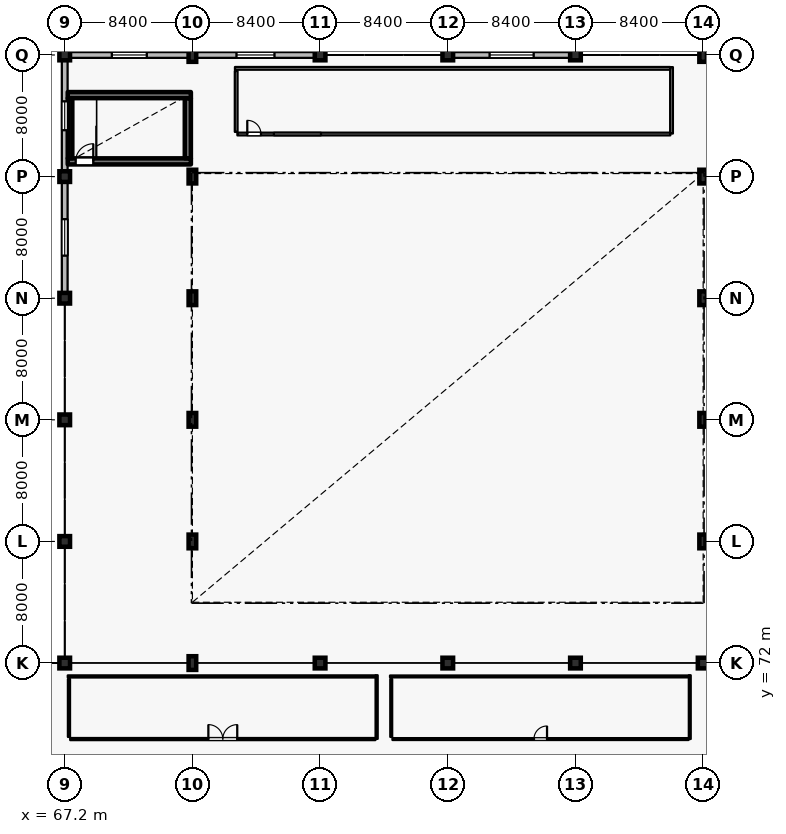
"""IFC4 building model, lengths in metres.
Left out: names, types, materials, properties, quantities, classifications, styles, units other than length and angle.
Written with IfcOpenShell. Run it as: python <this file> out.ifc"""

import sys

from ifc_helpers import new_model, si_unit, direction, frame, frame_2d, origin, origin_2d, place, context, subcontext, project, spatial, rectangle, hollow_rectangle, extrude, element, fill, save


model = new_model("IFC4")
c1 = context("Model", 3, precision=1e-05, world=origin(), true_north=direction((0.0, 1.0)))
c2 = subcontext(c1, "Body", "Model", "MODEL_VIEW")
j1 = project(units=[si_unit("LENGTHUNIT", "METRE"), si_unit("PLANEANGLEUNIT", "RADIAN")], contexts=[c1])
p1 = place(None, origin())
s1 = spatial("IfcSite", under=j1, at=p1, CompositionType="ELEMENT")
p2 = place(p1, origin())
s2 = spatial("IfcBuilding", under=s1, at=p2, CompositionType="ELEMENT")
p3 = place(p2, frame((0.0, 0.0, 11.4)))
s3 = spatial("IfcBuildingStorey", under=s2, at=p3, CompositionType="ELEMENT", Elevation=11.4)
for number, where, z_axis, x_axis in (
    (1, (67.2, 72.0, 0.0), (0.0, 0.0, 1.0), (1.0, 0.0, 0.0)),
    (2, (67.2, 80.0, 0.0), (0.0, 0.0, 1.0), (1.0, 0.0, 0.0)),
    (3, (67.2, 88.0, 0.0), (0.0, 0.0, 1.0), (1.0, 0.0, 0.0)),
    (4, (67.2, 96.0, 0.0), (0.0, 0.0, 1.0), (1.0, 0.0, 0.0)),
    (5, (67.2, 104.0, 0.0), (0.0, 0.0, 1.0), (1.0, 0.0, 0.0)),
    (6, (67.2, 112.0, 0.0), (0.0, 0.0, 1.0), (1.0, 0.0, 0.0)),
):
    element("IfcColumn", number, at=place(p3, frame(where, z_axis=z_axis, x_axis=x_axis)), inside=s3, PredefinedType="COLUMN", context=c2, shape_type="SweptSolid", body=[
        extrude(rectangle(XDim=0.7, YDim=0.7, at=origin_2d()), origin(), (0.0, 0.0, 1.0), 4.8),
    ])
for number, where, z_axis, x_axis in (
    (7, (75.6, 72.0, 0.0), (0.0, 0.0, 1.0), (1.0, 0.0, 0.0)),
    (8, (75.6, 80.0, 0.0), (0.0, 0.0, 1.0), (1.0, 0.0, 0.0)),
    (9, (75.6, 88.0, 0.0), (0.0, 0.0, 1.0), (1.0, 0.0, 0.0)),
    (10, (75.6, 96.0, 0.0), (0.0, 0.0, 1.0), (1.0, 0.0, 0.0)),
    (11, (75.6, 104.0, 0.0), (0.0, 0.0, 1.0), (1.0, 0.0, 0.0)),
    (12, (75.6, 112.0, 0.0), (0.0, 0.0, 1.0), (1.0, 0.0, 0.0)),
):
    element("IfcColumn", number, at=place(p3, frame(where, z_axis=z_axis, x_axis=x_axis)), inside=s3, PredefinedType="COLUMN", context=c2, shape_type="SweptSolid", body=[
        extrude(hollow_rectangle(XDim=0.5, YDim=0.9, WallThickness=0.024, at=origin_2d()), origin(), (0.0, 0.0, 1.0), 4.8),
    ])
for number, where, z_axis, x_axis in (
    (13, (84.0, 72.0, 0.0), (0.0, 0.0, 1.0), (1.0, 0.0, 0.0)),
    (14, (84.0, 112.0, 0.0), (0.0, 0.0, 1.0), (1.0, 0.0, 0.0)),
    (15, (92.4, 72.0, 0.0), (0.0, 0.0, 1.0), (1.0, 0.0, 0.0)),
    (16, (92.4, 112.0, 0.0), (0.0, 0.0, 1.0), (1.0, 0.0, 0.0)),
    (17, (100.8, 72.0, 0.0), (0.0, 0.0, 1.0), (1.0, 0.0, 0.0)),
    (18, (100.8, 112.0, 0.0), (0.0, 0.0, 1.0), (1.0, 0.0, 0.0)),
    (19, (109.2, 72.0, 0.0), (0.0, 0.0, 1.0), (1.0, 0.0, 0.0)),
):
    element("IfcColumn", number, at=place(p3, frame(where, z_axis=z_axis, x_axis=x_axis)), inside=s3, PredefinedType="COLUMN", context=c2, shape_type="SweptSolid", body=[
        extrude(rectangle(XDim=0.7, YDim=0.7, at=origin_2d()), origin(), (0.0, 0.0, 1.0), 4.8),
    ])
for number, where, z_axis, x_axis in (
    (20, (109.2, 80.0, 0.0), (0.0, 0.0, 1.0), (1.0, 0.0, 0.0)),
    (21, (109.2, 88.0, 0.0), (0.0, 0.0, 1.0), (1.0, 0.0, 0.0)),
    (22, (109.2, 96.0, 0.0), (0.0, 0.0, 1.0), (1.0, 0.0, 0.0)),
    (23, (109.2, 104.0, 0.0), (0.0, 0.0, 1.0), (1.0, 0.0, 0.0)),
    (24, (109.2, 112.0, 0.0), (0.0, 0.0, 1.0), (1.0, 0.0, 0.0)),
):
    element("IfcColumn", number, at=place(p3, frame(where, z_axis=z_axis, x_axis=x_axis)), inside=s3, PredefinedType="COLUMN", context=c2, shape_type="SweptSolid", body=[
        extrude(hollow_rectangle(XDim=0.5, YDim=0.9, WallThickness=0.024, at=origin_2d()), origin(), (0.0, 0.0, 1.0), 4.8),
    ])
p4 = place(p3, frame((67.2, 96.35, 0.0), z_axis=(0.0, 0.0, 1.0), x_axis=(0.0, 1.0, 0.0)))
e25 = element("IfcWall", 25, at=p4, inside=s3, PredefinedType="SOLIDWALL", context=c2, shape_type="SweptSolid", body=[
    extrude(rectangle(XDim=7.3, YDim=0.38, at=frame_2d((3.65, 0.0))), origin(), (0.0, 0.0, 1.0), 4.05),
])
p5 = place(p4, frame((2.45, 0.0, 1.05)))
e26 = element("IfcOpeningElement", 26, at=p5, cuts=e25, PredefinedType="OPENING", context=c2, shape_type="SweptSolid", body=[
    extrude(rectangle(XDim=2.4, YDim=1.2, at=frame_2d((1.2, 0.6))), frame((0.0, 0.2, 0.0), z_axis=(0.0, -1.0, 0.0), x_axis=(1.0, 0.0, 0.0)), (0.0, 0.0, 1.0), 0.4),
])
p6 = place(p3, frame((67.2, 104.35, 0.0), z_axis=(0.0, 0.0, 1.0), x_axis=(0.0, 1.0, 0.0)))
e27 = element("IfcWall", 27, at=p6, inside=s3, PredefinedType="SOLIDWALL", context=c2, shape_type="SweptSolid", body=[
    extrude(rectangle(XDim=7.3, YDim=0.38, at=frame_2d((3.65, 0.0))), origin(), (0.0, 0.0, 1.0), 4.05),
])
p7 = place(p6, frame((2.7, 0.0, 1.05)))
e28 = element("IfcOpeningElement", 28, at=p7, cuts=e27, PredefinedType="OPENING", context=c2, shape_type="SweptSolid", body=[
    extrude(rectangle(XDim=1.9, YDim=1.4, at=frame_2d((0.95, 0.7))), frame((0.0, 0.2, 0.0), z_axis=(0.0, -1.0, 0.0), x_axis=(1.0, 0.0, 0.0)), (0.0, 0.0, 1.0), 0.4),
])
p8 = place(p3, frame((67.55, 112.0, 0.0), z_axis=(0.0, 0.0, 1.0), x_axis=(1.0, 0.0, 0.0)))
e29 = element("IfcWall", 29, at=p8, inside=s3, PredefinedType="SOLIDWALL", context=c2, shape_type="SweptSolid", body=[
    extrude(rectangle(XDim=7.8, YDim=0.38, at=frame_2d((3.9, 0.0))), origin(), (0.0, 0.0, 1.0), 3.9),
])
p9 = place(p8, frame((2.75, 0.0, 1.05)))
e30 = element("IfcOpeningElement", 30, at=p9, cuts=e29, PredefinedType="OPENING", context=c2, shape_type="SweptSolid", body=[
    extrude(rectangle(XDim=2.3, YDim=1.5, at=frame_2d((1.15, 0.75))), frame((0.0, 0.2, 0.0), z_axis=(0.0, -1.0, 0.0), x_axis=(1.0, 0.0, 0.0)), (0.0, 0.0, 1.0), 0.4),
])
p10 = place(p3, frame((75.85, 112.0, 0.0), z_axis=(0.0, 0.0, 1.0), x_axis=(1.0, 0.0, 0.0)))
e31 = element("IfcWall", 31, at=p10, inside=s3, PredefinedType="SOLIDWALL", context=c2, shape_type="SweptSolid", body=[
    extrude(rectangle(XDim=7.8, YDim=0.38, at=frame_2d((3.9, 0.0))), origin(), (0.0, 0.0, 1.0), 3.9),
])
p11 = place(p10, frame((2.65, 0.0, 1.05)))
e32 = element("IfcOpeningElement", 32, at=p11, cuts=e31, PredefinedType="OPENING", context=c2, shape_type="SweptSolid", body=[
    extrude(rectangle(XDim=2.5, YDim=1.65, at=frame_2d((1.25, 0.825))), frame((0.0, 0.2, 0.0), z_axis=(0.0, -1.0, 0.0), x_axis=(1.0, 0.0, 0.0)), (0.0, 0.0, 1.0), 0.4),
])
p12 = place(p3, frame((92.75, 112.0, 0.0), z_axis=(0.0, 0.0, 1.0), x_axis=(1.0, 0.0, 0.0)))
e33 = element("IfcWall", 33, at=p12, inside=s3, PredefinedType="SOLIDWALL", context=c2, shape_type="SweptSolid", body=[
    extrude(rectangle(XDim=7.7, YDim=0.38, at=frame_2d((3.85, 0.0))), origin(), (0.0, 0.0, 1.0), 3.9),
])
p13 = place(p12, frame((2.4, 0.0, 1.05)))
e34 = element("IfcOpeningElement", 34, at=p13, cuts=e33, PredefinedType="OPENING", context=c2, shape_type="SweptSolid", body=[
    extrude(rectangle(XDim=2.9, YDim=1.75, at=frame_2d((1.45, 0.875))), frame((0.0, 0.2, 0.0), z_axis=(0.0, -1.0, 0.0), x_axis=(1.0, 0.0, 0.0)), (0.0, 0.0, 1.0), 0.4),
])
p14 = place(p3, frame((67.4, 105.0, 0.0), z_axis=(0.0, 0.0, 1.0), x_axis=(1.0, 0.0, 0.0)))
e35 = element("IfcWall", 35, at=p14, inside=s3, PredefinedType="SHEAR", context=c2, shape_type="SweptSolid", body=[
    extrude(rectangle(XDim=8.1, YDim=0.4, at=frame_2d((4.05, 0.0))), origin(), (0.0, 0.0, 1.0), 4.535),
])
p15 = place(p14, frame((0.52, 0.0, 0.0)))
e36 = element("IfcOpeningElement", 36, at=p15, cuts=e35, PredefinedType="OPENING", context=c2, shape_type="SweptSolid", body=[
    extrude(rectangle(XDim=1.16, YDim=2.2, at=frame_2d((0.58, 1.1))), frame((0.0, 0.21, 0.0), z_axis=(0.0, -1.0, 0.0), x_axis=(1.0, 0.0, 0.0)), (0.0, 0.0, 1.0), 0.42),
])
p16 = place(p3, frame((75.3, 105.205, 0.0), z_axis=(0.0, 0.0, 1.0), x_axis=(0.0, 1.0, 0.0)))
e37 = element("IfcWall", 37, at=p16, inside=s3, PredefinedType="SHEAR", context=c2, shape_type="SweptSolid", body=[
    extrude(rectangle(XDim=3.95, YDim=0.4, at=frame_2d((1.975, 0.0))), origin(), (0.0, 0.0, 1.0), 4.535),
])
p17 = place(p3, frame((67.4, 109.36, 0.0), z_axis=(0.0, 0.0, 1.0), x_axis=(1.0, 0.0, 0.0)))
e38 = element("IfcWall", 38, at=p17, inside=s3, PredefinedType="SHEAR", context=c2, shape_type="SweptSolid", body=[
    extrude(rectangle(XDim=8.1, YDim=0.4, at=frame_2d((4.05, 0.0))), origin(), (0.0, 0.0, 1.0), 4.535),
])
p18 = place(p3, frame((67.55, 105.205, 0.0), z_axis=(0.0, 0.0, 1.0), x_axis=(0.0, 1.0, 0.0)))
e39 = element("IfcWall", 39, at=p18, inside=s3, PredefinedType="SHEAR", context=c2, shape_type="SweptSolid", body=[
    extrude(rectangle(XDim=3.95, YDim=0.3, at=frame_2d((1.975, 0.0))), origin(), (0.0, 0.0, 1.0), 4.535),
])
p19 = place(p3, frame((78.56, 106.8, 0.0), z_axis=(0.0, 0.0, 1.0), x_axis=(1.0, 0.0, 0.0)))
e40 = element("IfcWall", 40, at=p19, inside=s3, PredefinedType="PARTITIONING", context=c2, shape_type="SweptSolid", body=[
    extrude(rectangle(XDim=28.48, YDim=0.18, at=frame_2d((14.24, 0.0))), origin(), (0.0, 0.0, 1.0), 4.535),
])
p20 = place(p19, frame((0.65, 0.0, 0.0)))
e41 = element("IfcOpeningElement", 41, at=p20, cuts=e40, PredefinedType="OPENING", context=c2, shape_type="SweptSolid", body=[
    extrude(rectangle(XDim=0.9, YDim=2.1, at=frame_2d((0.45, 1.05))), frame((0.0, 0.1, 0.0), z_axis=(0.0, -1.0, 0.0), x_axis=(1.0, 0.0, 0.0)), (0.0, 0.0, 1.0), 0.2),
])
p21 = place(p19, frame((2.4, 0.0, 0.9)))
e42 = element("IfcOpeningElement", 42, at=p21, cuts=e40, PredefinedType="OPENING", context=c2, shape_type="SweptSolid", body=[
    extrude(rectangle(XDim=3.1, YDim=1.3, at=frame_2d((1.55, 0.65))), frame((0.0, 0.1, 0.0), z_axis=(0.0, -1.0, 0.0), x_axis=(1.0, 0.0, 0.0)), (0.0, 0.0, 1.0), 0.2),
])
p22 = place(p3, frame((78.48, 106.94, 0.0), z_axis=(0.0, 0.0, 1.0), x_axis=(0.0, 1.0, 0.0)))
e43 = element("IfcWall", 43, at=p22, inside=s3, PredefinedType="PARTITIONING", context=c2, shape_type="SweptSolid", body=[
    extrude(rectangle(XDim=4.01, YDim=0.18, at=frame_2d((2.005, 0.0))), origin(), (0.0, 0.0, 1.0), 4.535),
])
p23 = place(p3, frame((67.56, 67.0, 0.0), z_axis=(0.0, 0.0, 1.0), x_axis=(1.0, 0.0, 0.0)))
e44 = element("IfcWall", 44, at=p23, inside=s3, PredefinedType="PARTITIONING", context=c2, shape_type="SweptSolid", body=[
    extrude(rectangle(XDim=20.08, YDim=0.14, at=frame_2d((10.04, 0.0))), origin(), (0.0, 0.0, 1.0), 4.535),
])
p24 = place(p23, frame((9.09, 0.0, 0.0)))
e45 = element("IfcOpeningElement", 45, at=p24, cuts=e44, PredefinedType="OPENING", context=c2, shape_type="SweptSolid", body=[
    extrude(rectangle(XDim=1.9, YDim=2.4, at=frame_2d((0.95, 1.2))), frame((0.0, 0.08, 0.0), z_axis=(0.0, -1.0, 0.0), x_axis=(1.0, 0.0, 0.0)), (0.0, 0.0, 1.0), 0.16),
])
p25 = place(p3, frame((67.48, 67.14, 0.0), z_axis=(0.0, 0.0, 1.0), x_axis=(0.0, 1.0, 0.0)))
e46 = element("IfcWall", 46, at=p25, inside=s3, PredefinedType="PARTITIONING", context=c2, shape_type="SweptSolid", body=[
    extrude(rectangle(XDim=3.81, YDim=0.14, at=frame_2d((1.905, 0.0))), origin(), (0.0, 0.0, 1.0), 4.535),
])
p26 = place(p3, frame((88.76, 67.0, 0.0), z_axis=(0.0, 0.0, 1.0), x_axis=(1.0, 0.0, 0.0)))
e47 = element("IfcWall", 47, at=p26, inside=s3, PredefinedType="PARTITIONING", context=c2, shape_type="SweptSolid", body=[
    extrude(rectangle(XDim=19.48, YDim=0.125, at=frame_2d((9.74, 0.0))), origin(), (0.0, 0.0, 1.0), 4.535),
])
p27 = place(p26, frame((9.31, 0.0, 0.0)))
e48 = element("IfcOpeningElement", 48, at=p27, cuts=e47, PredefinedType="OPENING", context=c2, shape_type="SweptSolid", body=[
    extrude(rectangle(XDim=0.86, YDim=2.12, at=frame_2d((0.43, 1.06))), frame((0.0, 0.073, 0.0), z_axis=(0.0, -1.0, 0.0), x_axis=(1.0, 0.0, 0.0)), (0.0, 0.0, 1.0), 0.145),
])
p28 = place(p3, frame((88.68, 67.14, 0.0), z_axis=(0.0, 0.0, 1.0), x_axis=(0.0, 1.0, 0.0)))
e49 = element("IfcWall", 49, at=p28, inside=s3, PredefinedType="PARTITIONING", context=c2, shape_type="SweptSolid", body=[
    extrude(rectangle(XDim=3.81, YDim=0.125, at=frame_2d((1.905, 0.0))), origin(), (0.0, 0.0, 1.0), 4.535),
])
p29 = place(p3, frame((107.12, 106.832, 0.0), z_axis=(0.0, 0.0, 1.0), x_axis=(0.0, 1.0, 0.0)))
e50 = element("IfcWall", 50, at=p29, inside=s3, PredefinedType="PARTITIONING", context=c2, shape_type="SweptSolid", body=[
    extrude(rectangle(XDim=4.368, YDim=0.18, at=frame_2d((2.184, 0.0))), origin(), (0.0, 0.0, 1.0), 4.535),
])
p30 = place(p3, frame((78.4, 111.12, 0.0), z_axis=(0.0, 0.0, 1.0), x_axis=(1.0, 0.0, 0.0)))
e51 = element("IfcWall", 51, at=p30, inside=s3, PredefinedType="PARTITIONING", context=c2, shape_type="SweptSolid", body=[
    extrude(rectangle(XDim=28.63, YDim=0.18, at=frame_2d((14.315, 0.0))), origin(), (0.0, 0.0, 1.0), 4.535),
])
p31 = place(p3, frame((87.72, 67.012, 0.0), z_axis=(0.0, 0.0, 1.0), x_axis=(0.0, 1.0, 0.0)))
e52 = element("IfcWall", 52, at=p31, inside=s3, PredefinedType="PARTITIONING", context=c2, shape_type="SweptSolid", body=[
    extrude(rectangle(XDim=4.188, YDim=0.14, at=frame_2d((2.094, 0.0))), origin(), (0.0, 0.0, 1.0), 4.535),
])
p32 = place(p3, frame((67.4, 71.12, 0.0), z_axis=(0.0, 0.0, 1.0), x_axis=(1.0, 0.0, 0.0)))
e53 = element("IfcWall", 53, at=p32, inside=s3, PredefinedType="PARTITIONING", context=c2, shape_type="SweptSolid", body=[
    extrude(rectangle(XDim=20.25, YDim=0.14, at=frame_2d((10.125, 0.0))), origin(), (0.0, 0.0, 1.0), 4.535),
])
p33 = place(p3, frame((108.32, 67.004, 0.0), z_axis=(0.0, 0.0, 1.0), x_axis=(0.0, 1.0, 0.0)))
e54 = element("IfcWall", 54, at=p33, inside=s3, PredefinedType="PARTITIONING", context=c2, shape_type="SweptSolid", body=[
    extrude(rectangle(XDim=4.196, YDim=0.125, at=frame_2d((2.098, 0.0))), origin(), (0.0, 0.0, 1.0), 4.535),
])
p34 = place(p3, frame((88.6, 71.12, 0.0), z_axis=(0.0, 0.0, 1.0), x_axis=(1.0, 0.0, 0.0)))
e55 = element("IfcWall", 55, at=p34, inside=s3, PredefinedType="PARTITIONING", context=c2, shape_type="SweptSolid", body=[
    extrude(rectangle(XDim=19.658, YDim=0.125, at=frame_2d((9.829, 0.0))), origin(), (0.0, 0.0, 1.0), 4.535),
])
p35 = place(p5, origin())
e56 = element("IfcWindow", 56, at=p35, inside=s3, PartitioningType="DOUBLE_PANEL_VERTICAL", PredefinedType="WINDOW", context=c2, shape_type="SweptSolid", body=[
    extrude(rectangle(XDim=2.4, YDim=1.2, at=frame_2d((1.2, 0.6))), frame((0.0, 0.03, 0.0), z_axis=(0.0, -1.0, 0.0), x_axis=(1.0, 0.0, 0.0)), (0.0, 0.0, 1.0), 0.06),
])
fill(e26, e56)
p36 = place(p7, origin())
e57 = element("IfcWindow", 57, at=p36, inside=s3, PartitioningType="DOUBLE_PANEL_VERTICAL", PredefinedType="WINDOW", context=c2, shape_type="SweptSolid", body=[
    extrude(rectangle(XDim=1.9, YDim=1.4, at=frame_2d((0.95, 0.7))), frame((0.0, 0.03, 0.0), z_axis=(0.0, -1.0, 0.0), x_axis=(1.0, 0.0, 0.0)), (0.0, 0.0, 1.0), 0.06),
])
fill(e28, e57)
p37 = place(p9, origin())
e58 = element("IfcWindow", 58, at=p37, inside=s3, PartitioningType="DOUBLE_PANEL_VERTICAL", PredefinedType="WINDOW", context=c2, shape_type="SweptSolid", body=[
    extrude(rectangle(XDim=2.3, YDim=1.5, at=frame_2d((1.15, 0.75))), frame((0.0, 0.03, 0.0), z_axis=(0.0, -1.0, 0.0), x_axis=(1.0, 0.0, 0.0)), (0.0, 0.0, 1.0), 0.06),
])
fill(e30, e58)
p38 = place(p11, origin())
e59 = element("IfcWindow", 59, at=p38, inside=s3, PartitioningType="DOUBLE_PANEL_VERTICAL", PredefinedType="WINDOW", context=c2, shape_type="SweptSolid", body=[
    extrude(rectangle(XDim=2.5, YDim=1.65, at=frame_2d((1.25, 0.825))), frame((0.0, 0.03, 0.0), z_axis=(0.0, -1.0, 0.0), x_axis=(1.0, 0.0, 0.0)), (0.0, 0.0, 1.0), 0.06),
])
fill(e32, e59)
p39 = place(p13, origin())
e60 = element("IfcWindow", 60, at=p39, inside=s3, PartitioningType="DOUBLE_PANEL_VERTICAL", PredefinedType="WINDOW", context=c2, shape_type="SweptSolid", body=[
    extrude(rectangle(XDim=2.9, YDim=1.75, at=frame_2d((1.45, 0.875))), frame((0.0, 0.03, 0.0), z_axis=(0.0, -1.0, 0.0), x_axis=(1.0, 0.0, 0.0)), (0.0, 0.0, 1.0), 0.06),
])
fill(e34, e60)
p40 = place(p15, origin())
e61 = element("IfcDoor", 61, at=p40, inside=s3, OperationType="SINGLE_SWING_RIGHT", PredefinedType="DOOR", context=c2, shape_type="SweptSolid", body=[
    extrude(rectangle(XDim=1.16, YDim=2.2, at=frame_2d((0.58, 1.1))), frame((0.0, 0.025, 0.0), z_axis=(0.0, -1.0, 0.0), x_axis=(1.0, 0.0, 0.0)), (0.0, 0.0, 1.0), 0.05),
])
fill(e36, e61)
p41 = place(p20, origin())
e62 = element("IfcDoor", 62, at=p41, inside=s3, OperationType="SINGLE_SWING_LEFT", PredefinedType="DOOR", context=c2, shape_type="SweptSolid", body=[
    extrude(rectangle(XDim=0.9, YDim=2.1, at=frame_2d((0.45, 1.05))), frame((0.0, 0.025, 0.0), z_axis=(0.0, -1.0, 0.0), x_axis=(1.0, 0.0, 0.0)), (0.0, 0.0, 1.0), 0.05),
])
fill(e41, e62)
p42 = place(p21, origin())
e63 = element("IfcWindow", 63, at=p42, inside=s3, PartitioningType="DOUBLE_PANEL_VERTICAL", PredefinedType="WINDOW", context=c2, shape_type="SweptSolid", body=[
    extrude(rectangle(XDim=3.1, YDim=1.3, at=frame_2d((1.55, 0.65))), frame((0.0, 0.03, 0.0), z_axis=(0.0, -1.0, 0.0), x_axis=(1.0, 0.0, 0.0)), (0.0, 0.0, 1.0), 0.06),
])
fill(e42, e63)
p43 = place(p24, origin())
e64 = element("IfcDoor", 64, at=p43, inside=s3, OperationType="DOUBLE_DOOR_SINGLE_SWING", PredefinedType="DOOR", context=c2, shape_type="SweptSolid", body=[
    extrude(rectangle(XDim=1.9, YDim=2.4, at=frame_2d((0.95, 1.2))), frame((0.0, 0.025, 0.0), z_axis=(0.0, -1.0, 0.0), x_axis=(1.0, 0.0, 0.0)), (0.0, 0.0, 1.0), 0.05),
])
fill(e45, e64)
p44 = place(p27, origin())
e65 = element("IfcDoor", 65, at=p44, inside=s3, OperationType="SINGLE_SWING_RIGHT", PredefinedType="DOOR", context=c2, shape_type="SweptSolid", body=[
    extrude(rectangle(XDim=0.86, YDim=2.12, at=frame_2d((0.43, 1.06))), frame((0.0, 0.025, 0.0), z_axis=(0.0, -1.0, 0.0), x_axis=(1.0, 0.0, 0.0)), (0.0, 0.0, 1.0), 0.05),
])
fill(e48, e65)
save(model, sys.argv[1])
